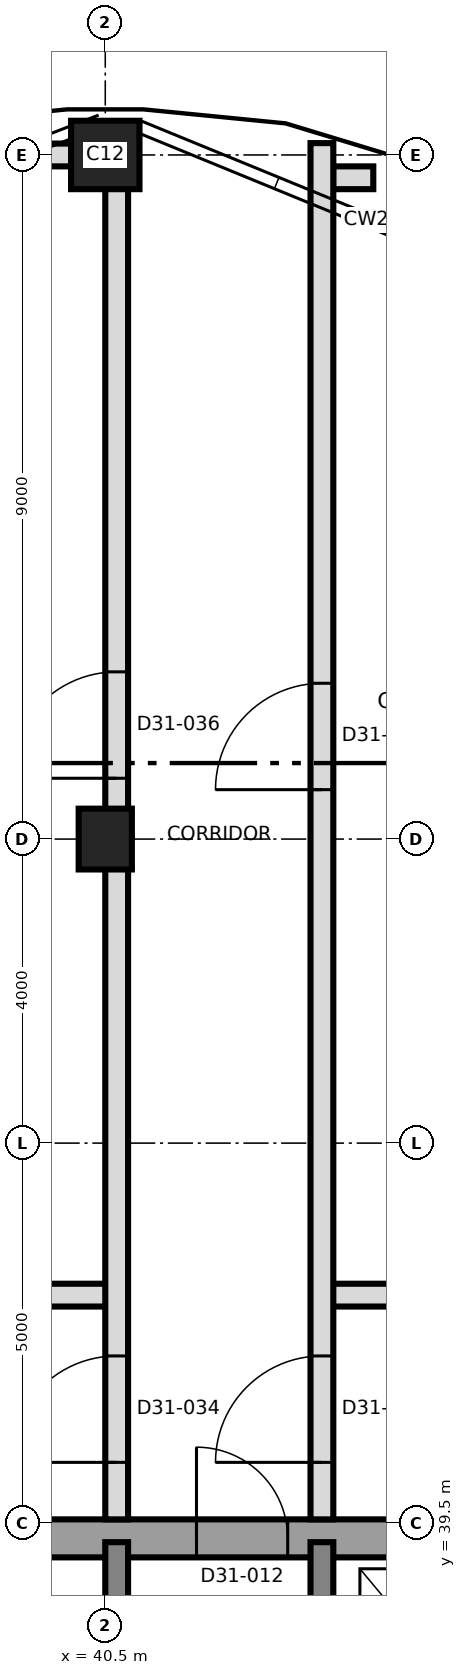
"""IFC4 building model, lengths in metres.
Left out: names, types, materials, properties, quantities, classifications, styles, units other than length and angle.
Written with IfcOpenShell. Run it as: python <this file> out.ifc"""

import sys

from ifc_helpers import new_model, si_unit, direction, frame, frame_2d, origin, origin_2d, place, context, subcontext, project, spatial, rectangle, extrude, element, fill, save


model = new_model("IFC4")
c1 = context("Model", 3, precision=1e-05, world=origin(), true_north=direction((0.0, 1.0)))
c2 = subcontext(c1, "Body", "Model", "MODEL_VIEW")
j1 = project(units=[si_unit("LENGTHUNIT", "METRE"), si_unit("PLANEANGLEUNIT", "RADIAN")], contexts=[c1])
p1 = place(None, origin())
s1 = spatial("IfcSite", under=j1, at=p1, CompositionType="ELEMENT")
p2 = place(p1, origin())
s2 = spatial("IfcBuilding", under=s1, at=p2, CompositionType="ELEMENT")
p3 = place(p2, frame((0.0, 0.0, 266.9)))
s3 = spatial("IfcBuildingStorey", under=s2, at=p3, CompositionType="ELEMENT", Elevation=266.9)
p4 = place(p3, frame((31.25, 39.3, 0.0), z_axis=(0.0, 0.0, 1.0), x_axis=(1.0, 0.0, 0.0)))
e1 = element("IfcWall", 1, at=p4, inside=s3, PredefinedType="SHEAR", context=c2, shape_type="SweptSolid", body=[
    extrude(rectangle(XDim=27.0, YDim=0.5, at=frame_2d((13.5, 0.0))), origin(), (0.0, 0.0, 1.0), 6.0),
])
p5 = place(p4, frame((10.45, 0.0, 0.0)))
e2 = element("IfcOpeningElement", 2, at=p5, cuts=e1, PredefinedType="OPENING", context=c2, shape_type="SweptSolid", body=[
    extrude(rectangle(XDim=1.2, YDim=2.1, at=frame_2d((0.6, 1.05))), frame((0.0, 0.26, 0.0), z_axis=(0.0, -1.0, 0.0), x_axis=(1.0, 0.0, 0.0)), (0.0, 0.0, 1.0), 0.52),
])
for number, where, z_axis, x_axis in (
    (3, (40.65, 33.5, 0.0), (0.0, 0.0, 1.0), (0.0, 1.0, 0.0)),
    (4, (43.35, 33.5, 0.0), (0.0, 0.0, 1.0), (0.0, 1.0, 0.0)),
):
    element("IfcWall", number, at=place(p3, frame(where, z_axis=z_axis, x_axis=x_axis)), inside=s3, PredefinedType="SHEAR", context=c2, shape_type="SweptSolid", body=[
        extrude(rectangle(XDim=5.75, YDim=0.3, at=frame_2d((2.875, 0.0))), origin(), (0.0, 0.0, 1.0), 6.0),
    ])
p6 = place(p3, frame((40.5, 48.5, 0.0), z_axis=(0.0, 0.0, 1.0), x_axis=(0.0, 1.0, 0.0)))
e5 = element("IfcColumn", 5, at=p6, inside=s3, PredefinedType="COLUMN", context=c2, shape_type="SweptSolid", body=[
    extrude(rectangle(XDim=0.8, YDim=0.7, at=origin_2d()), origin(), (0.0, 0.0, 1.0), 6.0),
])
p7 = place(p3, frame((40.5, 57.5, 0.0), z_axis=(0.0, 0.0, 1.0), x_axis=(1.0, 0.0, 0.0)))
e6 = element("IfcColumn", 6, at=p7, inside=s3, PredefinedType="COLUMN", context=c2, shape_type="SweptSolid", body=[
    extrude(rectangle(XDim=0.9, YDim=0.9, at=origin_2d()), origin(), (0.0, 0.0, 1.0), 6.0),
])
p8 = place(p3, frame((30.57, 42.5, 0.0), z_axis=(0.0, 0.0, 1.0), x_axis=(1.0, 0.0, 0.0)))
e7 = element("IfcWall", 7, at=p8, inside=s3, PredefinedType="PARTITIONING", context=c2, shape_type="SweptSolid", body=[
    extrude(rectangle(XDim=10.08, YDim=0.3, at=frame_2d((5.04, 0.0))), origin(), (0.0, 0.0, 1.0), 5.65),
])
p9 = place(p3, frame((43.35, 42.5, 0.0), z_axis=(0.0, 0.0, 1.0), x_axis=(1.0, 0.0, 0.0)))
e8 = element("IfcWall", 8, at=p9, inside=s3, PredefinedType="PARTITIONING", context=c2, shape_type="SweptSolid", body=[
    extrude(rectangle(XDim=8.244, YDim=0.3, at=frame_2d((4.122, 0.0))), origin(), (0.0, 0.0, 1.0), 5.65),
])
p10 = place(p3, frame((43.498, 57.2, 0.0), z_axis=(0.0, 0.0, 1.0), x_axis=(1.0, 0.0, 0.0)))
e9 = element("IfcWall", 9, at=p10, inside=s3, PredefinedType="PARTITIONING", context=c2, shape_type="SweptSolid", body=[
    extrude(rectangle(XDim=0.528, YDim=0.3, at=frame_2d((0.264, 0.0))), origin(), (0.0, 0.0, 1.0), 5.65),
])
p11 = place(p3, frame((37.112, 57.5, 0.0), z_axis=(0.0, 0.0, 1.0), x_axis=(1.0, 0.0, 0.0)))
e10 = element("IfcWall", 10, at=p11, inside=s3, PredefinedType="PARTITIONING", context=c2, shape_type="SweptSolid", body=[
    extrude(rectangle(XDim=3.538, YDim=0.3, at=frame_2d((1.769, 0.0))), origin(), (0.0, 0.0, 1.0), 5.65),
])
p12 = place(p3, frame((40.65, 39.55, 0.0), z_axis=(0.0, 0.0, 1.0), x_axis=(0.0, 1.0, 0.0)))
e11 = element("IfcWall", 11, at=p12, inside=s3, PredefinedType="PARTITIONING", context=c2, shape_type="SweptSolid", body=[
    extrude(rectangle(XDim=18.2, YDim=0.3, at=frame_2d((9.1, 0.0))), origin(), (0.0, 0.0, 1.0), 5.65),
])
p13 = place(p12, frame((0.75, 0.0, 0.0)))
e12 = element("IfcOpeningElement", 12, at=p13, cuts=e11, PredefinedType="OPENING", context=c2, shape_type="SweptSolid", body=[
    extrude(rectangle(XDim=1.4, YDim=2.1, at=frame_2d((0.7, 1.05))), frame((0.0, 0.16, 0.0), z_axis=(0.0, -1.0, 0.0), x_axis=(1.0, 0.0, 0.0)), (0.0, 0.0, 1.0), 0.32),
])
p14 = place(p12, frame((9.75, 0.0, 0.0)))
e13 = element("IfcOpeningElement", 13, at=p14, cuts=e11, PredefinedType="OPENING", context=c2, shape_type="SweptSolid", body=[
    extrude(rectangle(XDim=1.4, YDim=2.1, at=frame_2d((0.7, 1.05))), frame((0.0, 0.16, 0.0), z_axis=(0.0, -1.0, 0.0), x_axis=(1.0, 0.0, 0.0)), (0.0, 0.0, 1.0), 0.32),
])
p15 = place(p3, frame((43.35, 39.55, 0.0), z_axis=(0.0, 0.0, 1.0), x_axis=(0.0, 1.0, 0.0)))
e14 = element("IfcWall", 14, at=p15, inside=s3, PredefinedType="PARTITIONING", context=c2, shape_type="SweptSolid", body=[
    extrude(rectangle(XDim=18.106, YDim=0.3, at=frame_2d((9.053, 0.0))), origin(), (0.0, 0.0, 1.0), 5.65),
])
p16 = place(p15, frame((0.75, 0.0, 0.0)))
e15 = element("IfcOpeningElement", 15, at=p16, cuts=e14, PredefinedType="OPENING", context=c2, shape_type="SweptSolid", body=[
    extrude(rectangle(XDim=1.4, YDim=2.1, at=frame_2d((0.7, 1.05))), frame((0.0, 0.16, 0.0), z_axis=(0.0, -1.0, 0.0), x_axis=(1.0, 0.0, 0.0)), (0.0, 0.0, 1.0), 0.32),
])
p17 = place(p15, frame((9.6, 0.0, 0.0)))
e16 = element("IfcOpeningElement", 16, at=p17, cuts=e14, PredefinedType="OPENING", context=c2, shape_type="SweptSolid", body=[
    extrude(rectangle(XDim=1.4, YDim=2.1, at=frame_2d((0.7, 1.05))), frame((0.0, 0.16, 0.0), z_axis=(0.0, -1.0, 0.0), x_axis=(1.0, 0.0, 0.0)), (0.0, 0.0, 1.0), 0.32),
])
p18 = place(p5, origin())
e17 = element("IfcDoor", 17, at=p18, inside=s3, OperationType="SINGLE_SWING_RIGHT", PredefinedType="DOOR", context=c2, shape_type="SweptSolid", body=[
    extrude(rectangle(XDim=1.2, YDim=2.1, at=frame_2d((0.6, 1.05))), frame((0.0, 0.025, 0.0), z_axis=(0.0, -1.0, 0.0), x_axis=(1.0, 0.0, 0.0)), (0.0, 0.0, 1.0), 0.05),
])
fill(e2, e17)
p19 = place(p16, origin())
e18 = element("IfcDoor", 18, at=p19, inside=s3, OperationType="SINGLE_SWING_LEFT", PredefinedType="DOOR", context=c2, shape_type="SweptSolid", body=[
    extrude(rectangle(XDim=1.4, YDim=2.1, at=frame_2d((0.7, 1.05))), frame((0.0, 0.025, 0.0), z_axis=(0.0, -1.0, 0.0), x_axis=(1.0, 0.0, 0.0)), (0.0, 0.0, 1.0), 0.05),
])
fill(e15, e18)
p20 = place(p13, origin())
e19 = element("IfcDoor", 19, at=p20, inside=s3, OperationType="SINGLE_SWING_LEFT", PredefinedType="DOOR", context=c2, shape_type="SweptSolid", body=[
    extrude(rectangle(XDim=1.4, YDim=2.1, at=frame_2d((0.7, 1.05))), frame((0.0, 0.025, 0.0), z_axis=(0.0, -1.0, 0.0), x_axis=(1.0, 0.0, 0.0)), (0.0, 0.0, 1.0), 0.05),
])
fill(e12, e19)
p21 = place(p17, origin())
e20 = element("IfcDoor", 20, at=p21, inside=s3, OperationType="SINGLE_SWING_LEFT", PredefinedType="DOOR", context=c2, shape_type="SweptSolid", body=[
    extrude(rectangle(XDim=1.4, YDim=2.1, at=frame_2d((0.7, 1.05))), frame((0.0, 0.025, 0.0), z_axis=(0.0, -1.0, 0.0), x_axis=(1.0, 0.0, 0.0)), (0.0, 0.0, 1.0), 0.05),
])
fill(e16, e20)
p22 = place(p14, origin())
e21 = element("IfcDoor", 21, at=p22, inside=s3, OperationType="SINGLE_SWING_LEFT", PredefinedType="DOOR", context=c2, shape_type="SweptSolid", body=[
    extrude(rectangle(XDim=1.4, YDim=2.1, at=frame_2d((0.7, 1.05))), frame((0.0, 0.025, 0.0), z_axis=(0.0, -1.0, 0.0), x_axis=(1.0, 0.0, 0.0)), (0.0, 0.0, 1.0), 0.05),
])
fill(e13, e21)
save(model, sys.argv[1])
